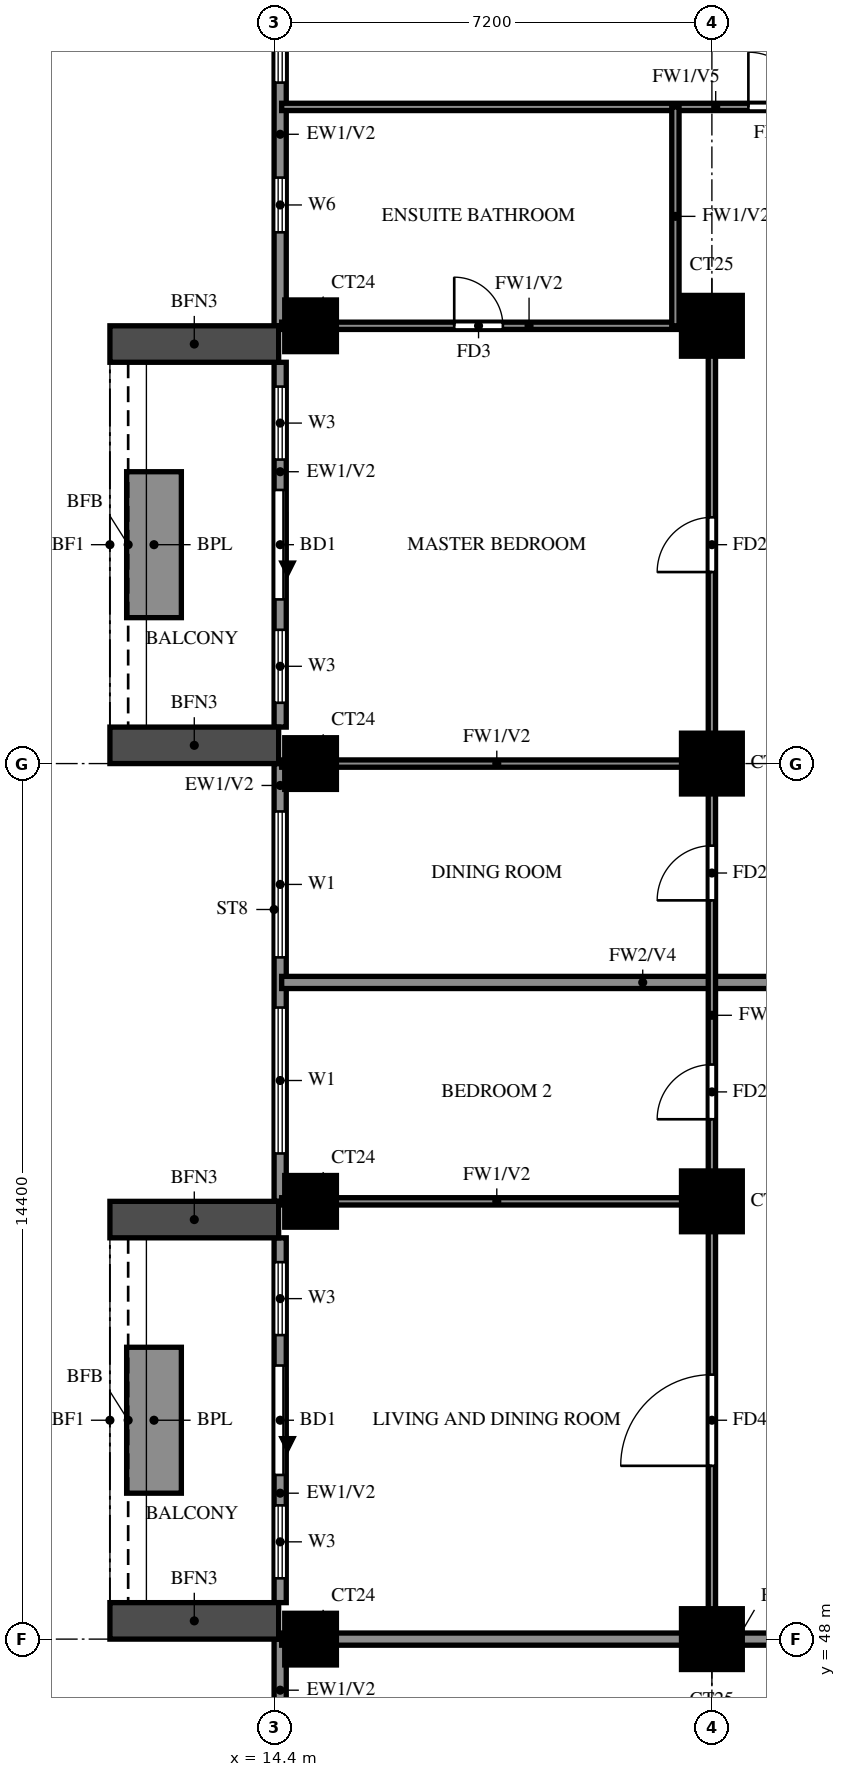
"""IFC4 building model, lengths in metres.
Left out: names, types, materials, properties, quantities, classifications, styles, units other than length and angle.
Written with IfcOpenShell. Run it as: python <this file> out.ifc"""

import sys

from ifc_helpers import new_model, si_unit, direction, frame, frame_2d, origin, origin_2d, place, context, subcontext, project, spatial, rectangle, extrude, source, transform, mapped, element, fill, save


model = new_model("IFC4")
c1 = context("Model", 3, precision=1e-05, world=origin(), true_north=direction((0.0, 1.0)))
c2 = subcontext(c1, "Body", "Model", "MODEL_VIEW")
j1 = project(units=[si_unit("LENGTHUNIT", "METRE"), si_unit("PLANEANGLEUNIT", "RADIAN")], contexts=[c1])
p1 = place(None, origin())
s1 = spatial("IfcSite", under=j1, at=p1, CompositionType="ELEMENT")
p2 = place(p1, origin())
s2 = spatial("IfcBuilding", under=s1, at=p2, CompositionType="ELEMENT")
p3 = place(p2, frame((0.0, 0.0, 153.5)))
s3 = spatial("IfcBuildingStorey", under=s2, at=p3, CompositionType="ELEMENT", Elevation=153.5)
m1 = source(origin(), c2, "Body", "SweptSolid", [
    extrude(rectangle(XDim=0.85, YDim=0.85, at=origin_2d()), origin(), (0.0, 0.0, 1.0), 3.2),
])
p4 = place(p3, frame((15.0, 48.0, 0.0), z_axis=(0.0, 0.0, 1.0), x_axis=(1.0, 0.0, 0.0)))
e1 = element("IfcColumn", 1, at=p4, inside=s3, PredefinedType="COLUMN", context=c2, shape_type="MappedRepresentation", body=[
    mapped(m1, transform((0.0, 0.0, 0.0))),
])
m2 = source(origin(), c2, "Body", "SweptSolid", [
    extrude(rectangle(XDim=1.0, YDim=1.0, at=origin_2d()), origin(), (0.0, 0.0, 1.0), 3.2),
])
p5 = place(p3, frame((21.6, 48.0, 0.0), z_axis=(0.0, 0.0, 1.0), x_axis=(1.0, 0.0, 0.0)))
e2 = element("IfcColumn", 2, at=p5, inside=s3, PredefinedType="COLUMN", context=c2, shape_type="MappedRepresentation", body=[
    mapped(m2, transform((0.0, 0.0, 0.0))),
])
p6 = place(p3, frame((15.0, 55.2, 0.0), z_axis=(0.0, 0.0, 1.0), x_axis=(1.0, 0.0, 0.0)))
e3 = element("IfcColumn", 3, at=p6, inside=s3, PredefinedType="COLUMN", context=c2, shape_type="MappedRepresentation", body=[
    mapped(m1, transform((0.0, 0.0, 0.0))),
])
p7 = place(p3, frame((21.6, 55.2, 0.0), z_axis=(0.0, 0.0, 1.0), x_axis=(1.0, 0.0, 0.0)))
e4 = element("IfcColumn", 4, at=p7, inside=s3, PredefinedType="COLUMN", context=c2, shape_type="MappedRepresentation", body=[
    mapped(m2, transform((0.0, 0.0, 0.0))),
])
p8 = place(p3, frame((15.0, 62.4, 0.0), z_axis=(0.0, 0.0, 1.0), x_axis=(1.0, 0.0, 0.0)))
e5 = element("IfcColumn", 5, at=p8, inside=s3, PredefinedType="COLUMN", context=c2, shape_type="MappedRepresentation", body=[
    mapped(m1, transform((0.0, 0.0, 0.0))),
])
p9 = place(p3, frame((21.6, 62.4, 0.0), z_axis=(0.0, 0.0, 1.0), x_axis=(1.0, 0.0, 0.0)))
e6 = element("IfcColumn", 6, at=p9, inside=s3, PredefinedType="COLUMN", context=c2, shape_type="MappedRepresentation", body=[
    mapped(m2, transform((0.0, 0.0, 0.0))),
])
p10 = place(p3, frame((15.0, 69.6, 0.0), z_axis=(0.0, 0.0, 1.0), x_axis=(1.0, 0.0, 0.0)))
e7 = element("IfcColumn", 7, at=p10, inside=s3, PredefinedType="COLUMN", context=c2, shape_type="MappedRepresentation", body=[
    mapped(m1, transform((0.0, 0.0, 0.0))),
])
p11 = place(p3, frame((21.6, 69.6, 0.0), z_axis=(0.0, 0.0, 1.0), x_axis=(1.0, 0.0, 0.0)))
e8 = element("IfcColumn", 8, at=p11, inside=s3, PredefinedType="COLUMN", context=c2, shape_type="MappedRepresentation", body=[
    mapped(m2, transform((0.0, 0.0, 0.0))),
])
p12 = place(p3, frame((14.5, 76.6, 0.0), z_axis=(0.0, 0.0, 1.0), x_axis=(0.0, -1.0, 0.0)))
e9 = element("IfcWall", 9, at=p12, inside=s3, PredefinedType="SOLIDWALL", context=c2, shape_type="SweptSolid", body=[
    extrude(rectangle(XDim=7.0, YDim=0.2, at=frame_2d((3.5, 0.0))), origin(), (0.0, 0.0, 1.0), 3.2),
])
p13 = place(p12, frame((4.562, 0.0, 1.5)))
e10 = element("IfcOpeningElement", 10, at=p13, cuts=e9, PredefinedType="OPENING", context=c2, shape_type="SweptSolid", body=[
    extrude(rectangle(XDim=0.9, YDim=0.9, at=frame_2d((0.45, 0.45))), frame((0.0, 0.11, 0.0), z_axis=(0.0, -1.0, 0.0), x_axis=(1.0, 0.0, 0.0)), (0.0, 0.0, 1.0), 0.22),
])
p14 = place(p12, frame((0.6, 0.0, 0.6)))
e11 = element("IfcOpeningElement", 11, at=p14, cuts=e9, PredefinedType="OPENING", context=c2, shape_type="SweptSolid", body=[
    extrude(rectangle(XDim=2.4, YDim=2.4, at=frame_2d((1.2, 1.2))), frame((0.0, 0.11, 0.0), z_axis=(0.0, -1.0, 0.0), x_axis=(1.0, 0.0, 0.0)), (0.0, 0.0, 1.0), 0.22),
])
p15 = place(p3, frame((14.5, 69.0, 0.0), z_axis=(0.0, 0.0, 1.0), x_axis=(0.0, -1.0, 0.0)))
e12 = element("IfcWall", 12, at=p15, inside=s3, PredefinedType="SOLIDWALL", context=c2, shape_type="SweptSolid", body=[
    extrude(rectangle(XDim=6.0, YDim=0.2, at=frame_2d((3.0, 0.0))), origin(), (0.0, 0.0, 1.0), 3.2),
])
p16 = place(p15, frame((2.1, 0.0, 0.0)))
e13 = element("IfcOpeningElement", 13, at=p16, cuts=e12, PredefinedType="OPENING", context=c2, shape_type="SweptSolid", body=[
    extrude(rectangle(XDim=1.8, YDim=2.4, at=frame_2d((0.9, 1.2))), frame((0.0, 0.11, 0.0), z_axis=(0.0, -1.0, 0.0), x_axis=(1.0, 0.0, 0.0)), (0.0, 0.0, 1.0), 0.22),
])
p17 = place(p15, frame((0.4, 0.0, 0.6)))
e14 = element("IfcOpeningElement", 14, at=p17, cuts=e12, PredefinedType="OPENING", context=c2, shape_type="SweptSolid", body=[
    extrude(rectangle(XDim=1.2, YDim=2.4, at=frame_2d((0.6, 1.2))), frame((0.0, 0.11, 0.0), z_axis=(0.0, -1.0, 0.0), x_axis=(1.0, 0.0, 0.0)), (0.0, 0.0, 1.0), 0.22),
])
p18 = place(p15, frame((4.4, 0.0, 0.6)))
e15 = element("IfcOpeningElement", 15, at=p18, cuts=e12, PredefinedType="OPENING", context=c2, shape_type="SweptSolid", body=[
    extrude(rectangle(XDim=1.2, YDim=2.4, at=frame_2d((0.6, 1.2))), frame((0.0, 0.11, 0.0), z_axis=(0.0, -1.0, 0.0), x_axis=(1.0, 0.0, 0.0)), (0.0, 0.0, 1.0), 0.22),
])
p19 = place(p3, frame((14.5, 62.4, 0.0), z_axis=(0.0, 0.0, 1.0), x_axis=(0.0, -1.0, 0.0)))
e16 = element("IfcWall", 16, at=p19, inside=s3, PredefinedType="SOLIDWALL", context=c2, shape_type="SweptSolid", body=[
    extrude(rectangle(XDim=7.2, YDim=0.2, at=frame_2d((3.6, 0.0))), origin(), (0.0, 0.0, 1.0), 3.2),
])
p20 = place(p19, frame((4.012, 0.0, 0.6)))
e17 = element("IfcOpeningElement", 17, at=p20, cuts=e16, PredefinedType="OPENING", context=c2, shape_type="SweptSolid", body=[
    extrude(rectangle(XDim=2.4, YDim=2.4, at=frame_2d((1.2, 1.2))), frame((0.0, 0.11, 0.0), z_axis=(0.0, -1.0, 0.0), x_axis=(1.0, 0.0, 0.0)), (0.0, 0.0, 1.0), 0.22),
])
p21 = place(p19, frame((0.788, 0.0, 0.6)))
e18 = element("IfcOpeningElement", 18, at=p21, cuts=e16, PredefinedType="OPENING", context=c2, shape_type="SweptSolid", body=[
    extrude(rectangle(XDim=2.4, YDim=2.4, at=frame_2d((1.2, 1.2))), frame((0.0, 0.11, 0.0), z_axis=(0.0, -1.0, 0.0), x_axis=(1.0, 0.0, 0.0)), (0.0, 0.0, 1.0), 0.22),
])
p22 = place(p3, frame((14.5, 54.6, 0.0), z_axis=(0.0, 0.0, 1.0), x_axis=(0.0, -1.0, 0.0)))
e19 = element("IfcWall", 19, at=p22, inside=s3, PredefinedType="SOLIDWALL", context=c2, shape_type="SweptSolid", body=[
    extrude(rectangle(XDim=6.0, YDim=0.2, at=frame_2d((3.0, 0.0))), origin(), (0.0, 0.0, 1.0), 3.2),
])
p23 = place(p22, frame((2.1, 0.0, 0.0)))
e20 = element("IfcOpeningElement", 20, at=p23, cuts=e19, PredefinedType="OPENING", context=c2, shape_type="SweptSolid", body=[
    extrude(rectangle(XDim=1.8, YDim=2.4, at=frame_2d((0.9, 1.2))), frame((0.0, 0.11, 0.0), z_axis=(0.0, -1.0, 0.0), x_axis=(1.0, 0.0, 0.0)), (0.0, 0.0, 1.0), 0.22),
])
p24 = place(p22, frame((0.4, 0.0, 0.6)))
e21 = element("IfcOpeningElement", 21, at=p24, cuts=e19, PredefinedType="OPENING", context=c2, shape_type="SweptSolid", body=[
    extrude(rectangle(XDim=1.2, YDim=2.4, at=frame_2d((0.6, 1.2))), frame((0.0, 0.11, 0.0), z_axis=(0.0, -1.0, 0.0), x_axis=(1.0, 0.0, 0.0)), (0.0, 0.0, 1.0), 0.22),
])
p25 = place(p22, frame((4.4, 0.0, 0.6)))
e22 = element("IfcOpeningElement", 22, at=p25, cuts=e19, PredefinedType="OPENING", context=c2, shape_type="SweptSolid", body=[
    extrude(rectangle(XDim=1.2, YDim=2.4, at=frame_2d((0.6, 1.2))), frame((0.0, 0.11, 0.0), z_axis=(0.0, -1.0, 0.0), x_axis=(1.0, 0.0, 0.0)), (0.0, 0.0, 1.0), 0.22),
])
p26 = place(p3, frame((14.5, 48.0, 0.0), z_axis=(0.0, 0.0, 1.0), x_axis=(0.0, -1.0, 0.0)))
e23 = element("IfcWall", 23, at=p26, inside=s3, PredefinedType="SOLIDWALL", context=c2, shape_type="SweptSolid", body=[
    extrude(rectangle(XDim=4.8, YDim=0.2, at=frame_2d((2.4, 0.0))), origin(), (0.0, 0.0, 1.0), 3.2),
])
p27 = place(p26, frame((1.288, 0.0, 0.6)))
e24 = element("IfcOpeningElement", 24, at=p27, cuts=e23, PredefinedType="OPENING", context=c2, shape_type="SweptSolid", body=[
    extrude(rectangle(XDim=2.4, YDim=2.4, at=frame_2d((1.2, 1.2))), frame((0.0, 0.11, 0.0), z_axis=(0.0, -1.0, 0.0), x_axis=(1.0, 0.0, 0.0)), (0.0, 0.0, 1.0), 0.22),
])
for number, where, z_axis, x_axis in (
    (25, (14.475, 69.3, 0.0), (0.0, 0.0, 1.0), (-1.0, 0.0, 0.0)),
    (26, (14.475, 62.7, 0.0), (0.0, 0.0, 1.0), (-1.0, 0.0, 0.0)),
):
    element("IfcWall", number, at=place(p3, frame(where, z_axis=z_axis, x_axis=x_axis)), inside=s3, PredefinedType="SOLIDWALL", context=c2, shape_type="SweptSolid", body=[
        extrude(rectangle(XDim=2.775, YDim=0.6, at=frame_2d((1.388, 0.0))), origin(), (0.0, 0.0, 1.0), 2.85),
    ])
p28 = place(p3, frame((12.425, 67.2, 0.0), z_axis=(0.0, 0.0, 1.0), x_axis=(0.0, -1.0, 0.0)))
e27 = element("IfcWall", 27, at=p28, inside=s3, PredefinedType="SOLIDWALL", context=c2, shape_type="SweptSolid", body=[
    extrude(rectangle(XDim=2.4, YDim=0.9, at=frame_2d((1.2, 0.0))), origin(), (0.0, 0.0, 1.0), 0.9),
])
for number, where, z_axis, x_axis in (
    (28, (14.475, 54.9, 0.0), (0.0, 0.0, 1.0), (-1.0, 0.0, 0.0)),
    (29, (14.475, 48.3, 0.0), (0.0, 0.0, 1.0), (-1.0, 0.0, 0.0)),
):
    element("IfcWall", number, at=place(p3, frame(where, z_axis=z_axis, x_axis=x_axis)), inside=s3, PredefinedType="SOLIDWALL", context=c2, shape_type="SweptSolid", body=[
        extrude(rectangle(XDim=2.775, YDim=0.6, at=frame_2d((1.388, 0.0))), origin(), (0.0, 0.0, 1.0), 2.85),
    ])
p29 = place(p3, frame((12.425, 52.8, 0.0), z_axis=(0.0, 0.0, 1.0), x_axis=(0.0, -1.0, 0.0)))
e30 = element("IfcWall", 30, at=p29, inside=s3, PredefinedType="SOLIDWALL", context=c2, shape_type="SweptSolid", body=[
    extrude(rectangle(XDim=2.4, YDim=0.9, at=frame_2d((1.2, 0.0))), origin(), (0.0, 0.0, 1.0), 0.9),
])
p30 = place(p3, frame((14.525, 48.0, 0.0), z_axis=(0.0, 0.0, 1.0), x_axis=(1.0, 0.0, 0.0)))
e31 = element("IfcWall", 31, at=p30, inside=s3, PredefinedType="SOLIDWALL", context=c2, shape_type="SweptSolid", body=[
    extrude(rectangle(XDim=14.275, YDim=0.2, at=frame_2d((7.138, 0.0))), origin(), (0.0, 0.0, 1.0), 3.2),
])
p31 = place(p3, frame((14.525, 58.8, 0.0), z_axis=(0.0, 0.0, 1.0), x_axis=(1.0, 0.0, 0.0)))
e32 = element("IfcWall", 32, at=p31, inside=s3, PredefinedType="SOLIDWALL", context=c2, shape_type="SweptSolid", body=[
    extrude(rectangle(XDim=11.875, YDim=0.2, at=frame_2d((5.938, 0.0))), origin(), (0.0, 0.0, 1.0), 2.3),
])
for number, where, z_axis, x_axis in (
    (33, (14.525, 55.2, 0.0), (0.0, 0.0, 1.0), (1.0, 0.0, 0.0)),
    (34, (14.525, 62.4, 0.0), (0.0, 0.0, 1.0), (1.0, 0.0, 0.0)),
):
    element("IfcWall", number, at=place(p3, frame(where, z_axis=z_axis, x_axis=x_axis)), inside=s3, PredefinedType="PARTITIONING", context=c2, shape_type="SweptSolid", body=[
        extrude(rectangle(XDim=7.075, YDim=0.12, at=frame_2d((3.538, 0.0))), origin(), (0.0, 0.0, 1.0), 3.2),
    ])
p32 = place(p3, frame((14.525, 69.6, 0.0), z_axis=(0.0, 0.0, 1.0), x_axis=(1.0, 0.0, 0.0)))
e35 = element("IfcWall", 35, at=p32, inside=s3, PredefinedType="PARTITIONING", context=c2, shape_type="SweptSolid", body=[
    extrude(rectangle(XDim=7.075, YDim=0.12, at=frame_2d((3.538, 0.0))), origin(), (0.0, 0.0, 1.0), 3.2),
])
p33 = place(p32, frame((2.837, 0.0, 0.0)))
e36 = element("IfcOpeningElement", 36, at=p33, cuts=e35, PredefinedType="OPENING", context=c2, shape_type="SweptSolid", body=[
    extrude(rectangle(XDim=0.8, YDim=2.1, at=frame_2d((0.4, 1.05))), frame((0.0, 0.07, 0.0), z_axis=(0.0, -1.0, 0.0), x_axis=(1.0, 0.0, 0.0)), (0.0, 0.0, 1.0), 0.14),
])
p34 = place(p3, frame((14.525, 73.2, 0.0), z_axis=(0.0, 0.0, 1.0), x_axis=(1.0, 0.0, 0.0)))
e37 = element("IfcWall", 37, at=p34, inside=s3, PredefinedType="PARTITIONING", context=c2, shape_type="SweptSolid", body=[
    extrude(rectangle(XDim=14.275, YDim=0.12, at=frame_2d((7.138, 0.0))), origin(), (0.0, 0.0, 1.0), 2.3),
])
p35 = place(p34, frame((7.675, 0.0, 0.0)))
e38 = element("IfcOpeningElement", 38, at=p35, cuts=e37, PredefinedType="OPENING", context=c2, shape_type="SweptSolid", body=[
    extrude(rectangle(XDim=0.9, YDim=2.1, at=frame_2d((0.45, 1.05))), frame((0.0, 0.07, 0.0), z_axis=(0.0, -1.0, 0.0), x_axis=(1.0, 0.0, 0.0)), (0.0, 0.0, 1.0), 0.14),
])
p36 = place(p3, frame((21.0, 69.6, 0.0), z_axis=(0.0, 0.0, 1.0), x_axis=(0.0, 1.0, 0.0)))
e39 = element("IfcWall", 39, at=p36, inside=s3, PredefinedType="PARTITIONING", context=c2, shape_type="SweptSolid", body=[
    extrude(rectangle(XDim=3.6, YDim=0.12, at=frame_2d((1.8, 0.0))), origin(), (0.0, 0.0, 1.0), 3.2),
])
p37 = place(p3, frame((21.6, 48.0, 0.0), z_axis=(0.0, 0.0, 1.0), x_axis=(0.0, 1.0, 0.0)))
e40 = element("IfcWall", 40, at=p37, inside=s3, PredefinedType="PARTITIONING", context=c2, shape_type="SweptSolid", body=[
    extrude(rectangle(XDim=21.6, YDim=0.12, at=frame_2d((10.8, 0.0))), origin(), (0.0, 0.0, 1.0), 3.2),
])
p38 = place(p37, frame((2.85, 0.0, 0.0)))
e41 = element("IfcOpeningElement", 41, at=p38, cuts=e40, PredefinedType="OPENING", context=c2, shape_type="SweptSolid", body=[
    extrude(rectangle(XDim=1.5, YDim=2.1, at=frame_2d((0.75, 1.05))), frame((0.0, 0.07, 0.0), z_axis=(0.0, -1.0, 0.0), x_axis=(1.0, 0.0, 0.0)), (0.0, 0.0, 1.0), 0.14),
])
p39 = place(p37, frame((8.55, 0.0, 0.0)))
e42 = element("IfcOpeningElement", 42, at=p39, cuts=e40, PredefinedType="OPENING", context=c2, shape_type="SweptSolid", body=[
    extrude(rectangle(XDim=0.9, YDim=2.1, at=frame_2d((0.45, 1.05))), frame((0.0, 0.07, 0.0), z_axis=(0.0, -1.0, 0.0), x_axis=(1.0, 0.0, 0.0)), (0.0, 0.0, 1.0), 0.14),
])
p40 = place(p37, frame((12.15, 0.0, 0.0)))
e43 = element("IfcOpeningElement", 43, at=p40, cuts=e40, PredefinedType="OPENING", context=c2, shape_type="SweptSolid", body=[
    extrude(rectangle(XDim=0.9, YDim=2.1, at=frame_2d((0.45, 1.05))), frame((0.0, 0.07, 0.0), z_axis=(0.0, -1.0, 0.0), x_axis=(1.0, 0.0, 0.0)), (0.0, 0.0, 1.0), 0.14),
])
p41 = place(p37, frame((17.55, 0.0, 0.0)))
e44 = element("IfcOpeningElement", 44, at=p41, cuts=e40, PredefinedType="OPENING", context=c2, shape_type="SweptSolid", body=[
    extrude(rectangle(XDim=0.9, YDim=2.1, at=frame_2d((0.45, 1.05))), frame((0.0, 0.07, 0.0), z_axis=(0.0, -1.0, 0.0), x_axis=(1.0, 0.0, 0.0)), (0.0, 0.0, 1.0), 0.14),
])
p42 = place(p13, origin())
e45 = element("IfcWindow", 45, at=p42, inside=s3, PartitioningType="SINGLE_PANEL", PredefinedType="WINDOW", context=c2, shape_type="SweptSolid", body=[
    extrude(rectangle(XDim=0.9, YDim=0.9, at=frame_2d((0.45, 0.45))), frame((0.0, 0.03, 0.0), z_axis=(0.0, -1.0, 0.0), x_axis=(1.0, 0.0, 0.0)), (0.0, 0.0, 1.0), 0.06),
])
fill(e10, e45)
p43 = place(p14, origin())
e46 = element("IfcWindow", 46, at=p43, inside=s3, PartitioningType="DOUBLE_PANEL_VERTICAL", PredefinedType="WINDOW", context=c2, shape_type="SweptSolid", body=[
    extrude(rectangle(XDim=2.4, YDim=2.4, at=frame_2d((1.2, 1.2))), frame((0.0, 0.03, 0.0), z_axis=(0.0, -1.0, 0.0), x_axis=(1.0, 0.0, 0.0)), (0.0, 0.0, 1.0), 0.06),
])
fill(e11, e46)
p44 = place(p16, origin())
e47 = element("IfcDoor", 47, at=p44, inside=s3, OperationType="DOUBLE_DOOR_SLIDING", PredefinedType="DOOR", context=c2, shape_type="SweptSolid", body=[
    extrude(rectangle(XDim=1.8, YDim=2.4, at=frame_2d((0.9, 1.2))), frame((0.0, 0.025, 0.0), z_axis=(0.0, -1.0, 0.0), x_axis=(1.0, 0.0, 0.0)), (0.0, 0.0, 1.0), 0.05),
])
fill(e13, e47)
p45 = place(p17, origin())
e48 = element("IfcWindow", 48, at=p45, inside=s3, PartitioningType="SINGLE_PANEL", PredefinedType="WINDOW", context=c2, shape_type="SweptSolid", body=[
    extrude(rectangle(XDim=1.2, YDim=2.4, at=frame_2d((0.6, 1.2))), frame((0.0, 0.03, 0.0), z_axis=(0.0, -1.0, 0.0), x_axis=(1.0, 0.0, 0.0)), (0.0, 0.0, 1.0), 0.06),
])
fill(e14, e48)
p46 = place(p18, origin())
e49 = element("IfcWindow", 49, at=p46, inside=s3, PartitioningType="SINGLE_PANEL", PredefinedType="WINDOW", context=c2, shape_type="SweptSolid", body=[
    extrude(rectangle(XDim=1.2, YDim=2.4, at=frame_2d((0.6, 1.2))), frame((0.0, 0.03, 0.0), z_axis=(0.0, -1.0, 0.0), x_axis=(1.0, 0.0, 0.0)), (0.0, 0.0, 1.0), 0.06),
])
fill(e15, e49)
p47 = place(p20, origin())
e50 = element("IfcWindow", 50, at=p47, inside=s3, PartitioningType="DOUBLE_PANEL_VERTICAL", PredefinedType="WINDOW", context=c2, shape_type="SweptSolid", body=[
    extrude(rectangle(XDim=2.4, YDim=2.4, at=frame_2d((1.2, 1.2))), frame((0.0, 0.03, 0.0), z_axis=(0.0, -1.0, 0.0), x_axis=(1.0, 0.0, 0.0)), (0.0, 0.0, 1.0), 0.06),
])
fill(e17, e50)
p48 = place(p21, origin())
e51 = element("IfcWindow", 51, at=p48, inside=s3, PartitioningType="DOUBLE_PANEL_VERTICAL", PredefinedType="WINDOW", context=c2, shape_type="SweptSolid", body=[
    extrude(rectangle(XDim=2.4, YDim=2.4, at=frame_2d((1.2, 1.2))), frame((0.0, 0.03, 0.0), z_axis=(0.0, -1.0, 0.0), x_axis=(1.0, 0.0, 0.0)), (0.0, 0.0, 1.0), 0.06),
])
fill(e18, e51)
p49 = place(p23, origin())
e52 = element("IfcDoor", 52, at=p49, inside=s3, OperationType="DOUBLE_DOOR_SLIDING", PredefinedType="DOOR", context=c2, shape_type="SweptSolid", body=[
    extrude(rectangle(XDim=1.8, YDim=2.4, at=frame_2d((0.9, 1.2))), frame((0.0, 0.025, 0.0), z_axis=(0.0, -1.0, 0.0), x_axis=(1.0, 0.0, 0.0)), (0.0, 0.0, 1.0), 0.05),
])
fill(e20, e52)
p50 = place(p24, origin())
e53 = element("IfcWindow", 53, at=p50, inside=s3, PartitioningType="SINGLE_PANEL", PredefinedType="WINDOW", context=c2, shape_type="SweptSolid", body=[
    extrude(rectangle(XDim=1.2, YDim=2.4, at=frame_2d((0.6, 1.2))), frame((0.0, 0.03, 0.0), z_axis=(0.0, -1.0, 0.0), x_axis=(1.0, 0.0, 0.0)), (0.0, 0.0, 1.0), 0.06),
])
fill(e21, e53)
p51 = place(p25, origin())
e54 = element("IfcWindow", 54, at=p51, inside=s3, PartitioningType="SINGLE_PANEL", PredefinedType="WINDOW", context=c2, shape_type="SweptSolid", body=[
    extrude(rectangle(XDim=1.2, YDim=2.4, at=frame_2d((0.6, 1.2))), frame((0.0, 0.03, 0.0), z_axis=(0.0, -1.0, 0.0), x_axis=(1.0, 0.0, 0.0)), (0.0, 0.0, 1.0), 0.06),
])
fill(e22, e54)
p52 = place(p38, origin())
e55 = element("IfcDoor", 55, at=p52, inside=s3, OperationType="SINGLE_SWING_RIGHT", PredefinedType="DOOR", context=c2, shape_type="SweptSolid", body=[
    extrude(rectangle(XDim=1.5, YDim=2.1, at=frame_2d((0.75, 1.05))), frame((0.0, 0.025, 0.0), z_axis=(0.0, -1.0, 0.0), x_axis=(1.0, 0.0, 0.0)), (0.0, 0.0, 1.0), 0.05),
])
fill(e41, e55)
p53 = place(p39, origin())
e56 = element("IfcDoor", 56, at=p53, inside=s3, OperationType="SINGLE_SWING_LEFT", PredefinedType="DOOR", context=c2, shape_type="SweptSolid", body=[
    extrude(rectangle(XDim=0.9, YDim=2.1, at=frame_2d((0.45, 1.05))), frame((0.0, 0.025, 0.0), z_axis=(0.0, -1.0, 0.0), x_axis=(1.0, 0.0, 0.0)), (0.0, 0.0, 1.0), 0.05),
])
fill(e42, e56)
p54 = place(p40, origin())
e57 = element("IfcDoor", 57, at=p54, inside=s3, OperationType="SINGLE_SWING_LEFT", PredefinedType="DOOR", context=c2, shape_type="SweptSolid", body=[
    extrude(rectangle(XDim=0.9, YDim=2.1, at=frame_2d((0.45, 1.05))), frame((0.0, 0.025, 0.0), z_axis=(0.0, -1.0, 0.0), x_axis=(1.0, 0.0, 0.0)), (0.0, 0.0, 1.0), 0.05),
])
fill(e43, e57)
p55 = place(p41, origin())
e58 = element("IfcDoor", 58, at=p55, inside=s3, OperationType="SINGLE_SWING_RIGHT", PredefinedType="DOOR", context=c2, shape_type="SweptSolid", body=[
    extrude(rectangle(XDim=0.9, YDim=2.1, at=frame_2d((0.45, 1.05))), frame((0.0, 0.025, 0.0), z_axis=(0.0, -1.0, 0.0), x_axis=(1.0, 0.0, 0.0)), (0.0, 0.0, 1.0), 0.05),
])
fill(e44, e58)
p56 = place(p33, origin())
e59 = element("IfcDoor", 59, at=p56, inside=s3, OperationType="SINGLE_SWING_LEFT", PredefinedType="DOOR", context=c2, shape_type="SweptSolid", body=[
    extrude(rectangle(XDim=0.8, YDim=2.1, at=frame_2d((0.4, 1.05))), frame((0.0, 0.025, 0.0), z_axis=(0.0, -1.0, 0.0), x_axis=(1.0, 0.0, 0.0)), (0.0, 0.0, 1.0), 0.05),
])
fill(e36, e59)
p57 = place(p35, origin())
e60 = element("IfcDoor", 60, at=p57, inside=s3, OperationType="SINGLE_SWING_LEFT", PredefinedType="DOOR", context=c2, shape_type="SweptSolid", body=[
    extrude(rectangle(XDim=0.9, YDim=2.1, at=frame_2d((0.45, 1.05))), frame((0.0, 0.025, 0.0), z_axis=(0.0, -1.0, 0.0), x_axis=(1.0, 0.0, 0.0)), (0.0, 0.0, 1.0), 0.05),
])
fill(e38, e60)
save(model, sys.argv[1])
